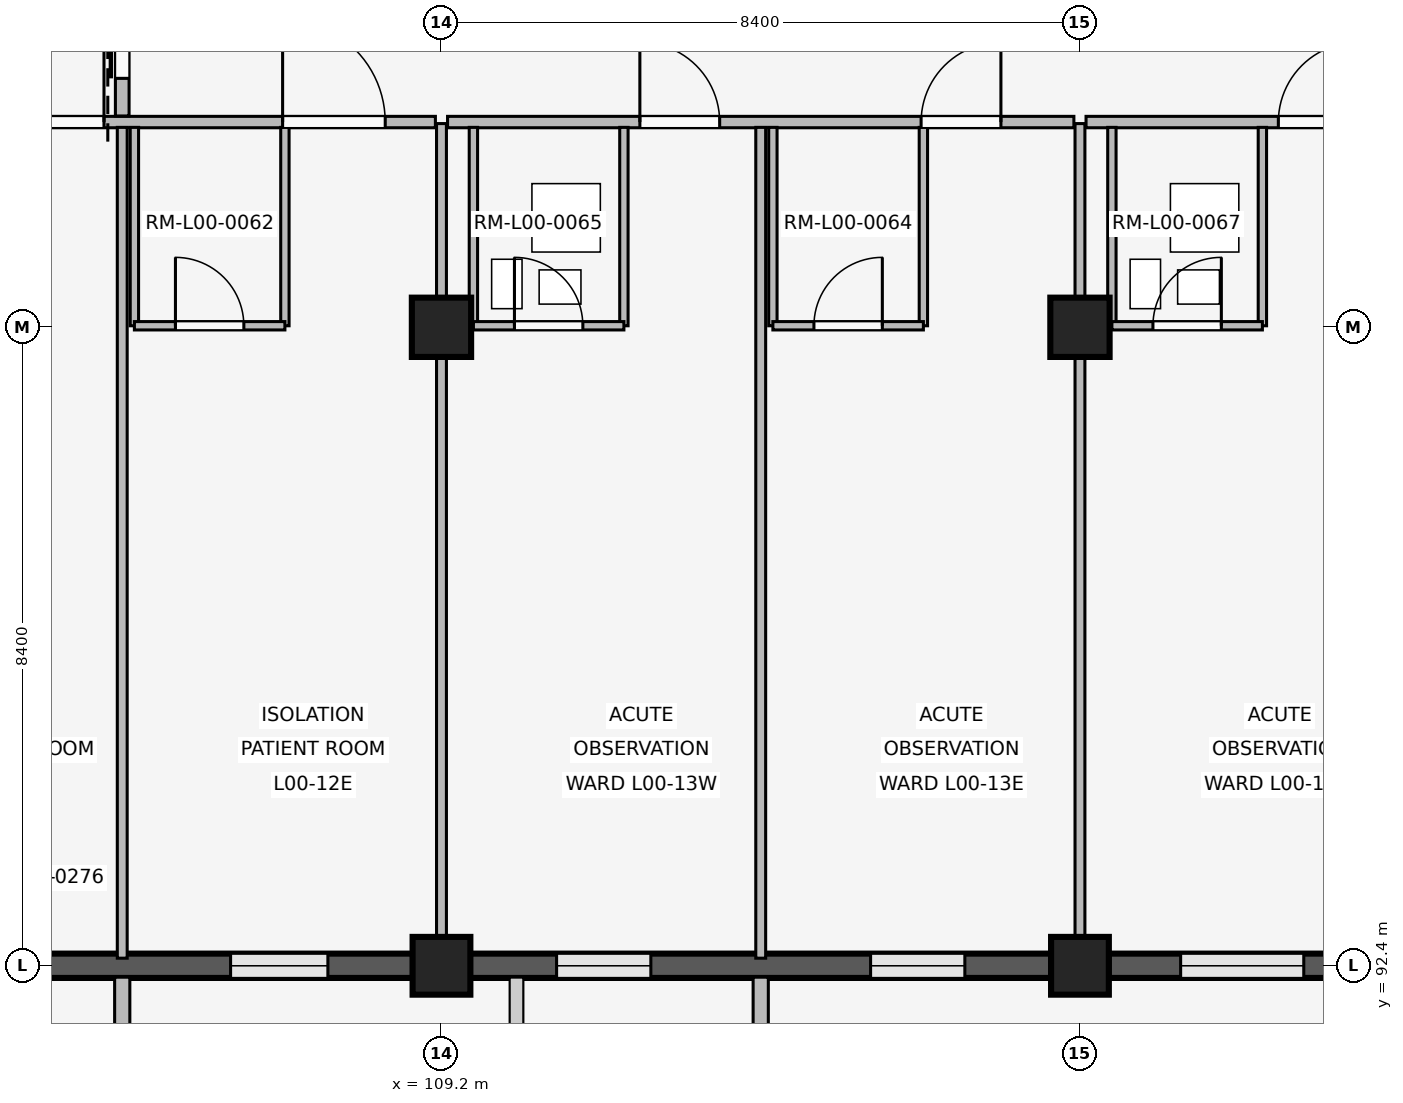
"""IFC4 building model, lengths in metres.
Left out: names, types, materials, properties, quantities, classifications, styles, units other than length and angle.
Written with IfcOpenShell. Run it as: python <this file> out.ifc"""

import sys

from ifc_helpers import new_model, si_unit, direction, frame, frame_2d, origin, origin_2d, place, context, subcontext, project, spatial, rectangle, extrude, element, fill, save


model = new_model("IFC4")
c1 = context("Model", 3, precision=1e-05, world=origin(), true_north=direction((0.0, 1.0)))
c2 = subcontext(c1, "Body", "Model", "MODEL_VIEW")
j1 = project(units=[si_unit("LENGTHUNIT", "METRE"), si_unit("PLANEANGLEUNIT", "RADIAN")], contexts=[c1])
p1 = place(None, origin())
s1 = spatial("IfcSite", under=j1, at=p1, CompositionType="ELEMENT")
p2 = place(p1, origin())
s2 = spatial("IfcBuilding", under=s1, at=p2, CompositionType="ELEMENT")
p3 = place(p2, origin())
s3 = spatial("IfcBuildingStorey", under=s2, at=p3, CompositionType="ELEMENT", Elevation=0.0)
p4 = place(p3, frame((109.2, 92.4, 0.0), z_axis=(0.0, 0.0, 1.0), x_axis=(1.0, 0.0, 0.0)))
e1 = element("IfcColumn", 1, at=p4, inside=s3, PredefinedType="COLUMN", context=c2, shape_type="SweptSolid", body=[
    extrude(rectangle(XDim=0.76, YDim=0.76, at=origin_2d()), origin(), (0.0, 0.0, 1.0), 4.8),
])
p5 = place(p3, frame((109.2, 100.8, 0.0), z_axis=(0.0, 0.0, 1.0), x_axis=(1.0, 0.0, 0.0)))
e2 = element("IfcColumn", 2, at=p5, inside=s3, PredefinedType="COLUMN", context=c2, shape_type="SweptSolid", body=[
    extrude(rectangle(XDim=0.78, YDim=0.78, at=origin_2d()), origin(), (0.0, 0.0, 1.0), 4.8),
])
p6 = place(p3, frame((117.6, 92.4, 0.0), z_axis=(0.0, 0.0, 1.0), x_axis=(1.0, 0.0, 0.0)))
e3 = element("IfcColumn", 3, at=p6, inside=s3, PredefinedType="COLUMN", context=c2, shape_type="SweptSolid", body=[
    extrude(rectangle(XDim=0.76, YDim=0.76, at=origin_2d()), origin(), (0.0, 0.0, 1.0), 4.8),
])
p7 = place(p3, frame((117.6, 100.8, 0.0), z_axis=(0.0, 0.0, 1.0), x_axis=(1.0, 0.0, 0.0)))
e4 = element("IfcColumn", 4, at=p7, inside=s3, PredefinedType="COLUMN", context=c2, shape_type="SweptSolid", body=[
    extrude(rectangle(XDim=0.78, YDim=0.78, at=origin_2d()), origin(), (0.0, 0.0, 1.0), 4.8),
])
p8 = place(p3, frame((108.825, 92.4, 0.0), z_axis=(0.0, 0.0, 1.0), x_axis=(-1.0, 0.0, 0.0)))
e5 = element("IfcWall", 5, at=p8, inside=s3, PredefinedType="SOLIDWALL", context=c2, shape_type="SweptSolid", body=[
    extrude(rectangle(XDim=7.65, YDim=0.32, at=frame_2d((3.825, 0.0))), origin(), (0.0, 0.0, 1.0), 3.82),
])
p9 = place(p8, frame((1.119, 0.0, 0.85)))
e6 = element("IfcOpeningElement", 6, at=p9, cuts=e5, PredefinedType="OPENING", context=c2, shape_type="SweptSolid", body=[
    extrude(rectangle(XDim=1.28, YDim=1.38, at=frame_2d((0.64, 0.69))), frame((0.0, 0.17, 0.0), z_axis=(0.0, -1.0, 0.0), x_axis=(1.0, 0.0, 0.0)), (0.0, 0.0, 1.0), 0.34),
])
p10 = place(p8, frame((5.25, 0.0, 0.85)))
e7 = element("IfcOpeningElement", 7, at=p10, cuts=e5, PredefinedType="OPENING", context=c2, shape_type="SweptSolid", body=[
    extrude(rectangle(XDim=1.28, YDim=1.38, at=frame_2d((0.64, 0.69))), frame((0.0, 0.17, 0.0), z_axis=(0.0, -1.0, 0.0), x_axis=(1.0, 0.0, 0.0)), (0.0, 0.0, 1.0), 0.34),
])
p11 = place(p3, frame((105.0, 92.25, 0.0), z_axis=(0.0, 0.0, 1.0), x_axis=(0.0, -1.0, 0.0)))
e8 = element("IfcWall", 8, at=p11, inside=s3, PredefinedType="ELEMENTEDWALL", context=c2, shape_type="SweptSolid", body=[
    extrude(rectangle(XDim=0.85, YDim=0.2, at=frame_2d((0.425, 0.0))), origin(), (0.0, 0.0, 1.0), 3.8),
])
p12 = place(p3, frame((117.225, 92.4, 0.0), z_axis=(0.0, 0.0, 1.0), x_axis=(-1.0, 0.0, 0.0)))
e9 = element("IfcWall", 9, at=p12, inside=s3, PredefinedType="SOLIDWALL", context=c2, shape_type="SweptSolid", body=[
    extrude(rectangle(XDim=7.65, YDim=0.32, at=frame_2d((3.825, 0.0))), origin(), (0.0, 0.0, 1.0), 3.82),
])
p13 = place(p12, frame((1.139, 0.0, 0.85)))
e10 = element("IfcOpeningElement", 10, at=p13, cuts=e9, PredefinedType="OPENING", context=c2, shape_type="SweptSolid", body=[
    extrude(rectangle(XDim=1.24, YDim=1.34, at=frame_2d((0.62, 0.67))), frame((0.0, 0.17, 0.0), z_axis=(0.0, -1.0, 0.0), x_axis=(1.0, 0.0, 0.0)), (0.0, 0.0, 1.0), 0.34),
])
p14 = place(p12, frame((5.271, 0.0, 0.85)))
e11 = element("IfcOpeningElement", 11, at=p14, cuts=e9, PredefinedType="OPENING", context=c2, shape_type="SweptSolid", body=[
    extrude(rectangle(XDim=1.24, YDim=1.34, at=frame_2d((0.62, 0.67))), frame((0.0, 0.17, 0.0), z_axis=(0.0, -1.0, 0.0), x_axis=(1.0, 0.0, 0.0)), (0.0, 0.0, 1.0), 0.34),
])
p15 = place(p3, frame((113.4, 92.25, 0.0), z_axis=(0.0, 0.0, 1.0), x_axis=(0.0, -1.0, 0.0)))
e12 = element("IfcWall", 12, at=p15, inside=s3, PredefinedType="ELEMENTEDWALL", context=c2, shape_type="SweptSolid", body=[
    extrude(rectangle(XDim=0.85, YDim=0.2, at=frame_2d((0.425, 0.0))), origin(), (0.0, 0.0, 1.0), 3.8),
])
p16 = place(p3, frame((125.625, 92.4, 0.0), z_axis=(0.0, 0.0, 1.0), x_axis=(-1.0, 0.0, 0.0)))
e13 = element("IfcWall", 13, at=p16, inside=s3, PredefinedType="SOLIDWALL", context=c2, shape_type="SweptSolid", body=[
    extrude(rectangle(XDim=7.65, YDim=0.32, at=frame_2d((3.825, 0.0))), origin(), (0.0, 0.0, 1.0), 3.82),
])
p17 = place(p16, frame((0.949, 0.0, 0.85)))
e14 = element("IfcOpeningElement", 14, at=p17, cuts=e13, PredefinedType="OPENING", context=c2, shape_type="SweptSolid", body=[
    extrude(rectangle(XDim=1.62, YDim=1.52, at=frame_2d((0.81, 0.76))), frame((0.0, 0.17, 0.0), z_axis=(0.0, -1.0, 0.0), x_axis=(1.0, 0.0, 0.0)), (0.0, 0.0, 1.0), 0.34),
])
p18 = place(p16, frame((5.081, 0.0, 0.85)))
e15 = element("IfcOpeningElement", 15, at=p18, cuts=e13, PredefinedType="OPENING", context=c2, shape_type="SweptSolid", body=[
    extrude(rectangle(XDim=1.62, YDim=1.52, at=frame_2d((0.81, 0.76))), frame((0.0, 0.17, 0.0), z_axis=(0.0, -1.0, 0.0), x_axis=(1.0, 0.0, 0.0)), (0.0, 0.0, 1.0), 0.34),
])
p19 = place(p3, frame((100.88, 103.5, 0.0), z_axis=(0.0, 0.0, 1.0), x_axis=(1.0, 0.0, 0.0)))
e16 = element("IfcWall", 16, at=p19, inside=s3, PredefinedType="PARTITIONING", context=c2, shape_type="SweptSolid", body=[
    extrude(rectangle(XDim=8.24, YDim=0.15, at=frame_2d((4.12, 0.0))), origin(), (0.0, 0.0, 1.0), 3.8),
])
p20 = place(p19, frame((2.53, 0.0, 0.0)))
e17 = element("IfcOpeningElement", 17, at=p20, cuts=e16, PredefinedType="OPENING", context=c2, shape_type="SweptSolid", body=[
    extrude(rectangle(XDim=1.35, YDim=2.25, at=frame_2d((0.675, 1.125))), frame((0.0, 0.085, 0.0), z_axis=(0.0, -1.0, 0.0), x_axis=(1.0, 0.0, 0.0)), (0.0, 0.0, 1.0), 0.17),
])
p21 = place(p19, frame((6.23, 0.0, 0.0)))
e18 = element("IfcOpeningElement", 18, at=p21, cuts=e16, PredefinedType="OPENING", context=c2, shape_type="SweptSolid", body=[
    extrude(rectangle(XDim=1.35, YDim=2.25, at=frame_2d((0.675, 1.125))), frame((0.0, 0.085, 0.0), z_axis=(0.0, -1.0, 0.0), x_axis=(1.0, 0.0, 0.0)), (0.0, 0.0, 1.0), 0.17),
])
p22 = place(p3, frame((105.0, 92.5, 0.0), z_axis=(0.0, 0.0, 1.0), x_axis=(0.0, 1.0, 0.0)))
e19 = element("IfcWall", 19, at=p22, inside=s3, PredefinedType="PARTITIONING", context=c2, shape_type="SweptSolid", body=[
    extrude(rectangle(XDim=10.93, YDim=0.13, at=frame_2d((5.465, 0.0))), origin(), (0.0, 0.0, 1.0), 3.8),
])
for number, where, z_axis, x_axis in (
    (20, (105.16, 100.82, 0.0), (0.0, 0.0, 1.0), (0.0, 1.0, 0.0)),
    (21, (107.14, 100.82, 0.0), (0.0, 0.0, 1.0), (0.0, 1.0, 0.0)),
):
    element("IfcWall", number, at=place(p3, frame(where, z_axis=z_axis, x_axis=x_axis)), inside=s3, PredefinedType="PARTITIONING", context=c2, shape_type="SweptSolid", body=[
        extrude(rectangle(XDim=2.61, YDim=0.11, at=frame_2d((1.305, 0.0))), origin(), (0.0, 0.0, 1.0), 3.8),
    ])
p23 = place(p3, frame((105.16, 100.82, 0.0), z_axis=(0.0, 0.0, 1.0), x_axis=(1.0, 0.0, 0.0)))
e22 = element("IfcWall", 22, at=p23, inside=s3, PredefinedType="PARTITIONING", context=c2, shape_type="SweptSolid", body=[
    extrude(rectangle(XDim=1.98, YDim=0.11, at=frame_2d((0.99, 0.0))), origin(), (0.0, 0.0, 1.0), 3.8),
])
p24 = place(p23, frame((0.54, 0.0, 0.0)))
e23 = element("IfcOpeningElement", 23, at=p24, cuts=e22, PredefinedType="OPENING", context=c2, shape_type="SweptSolid", body=[
    extrude(rectangle(XDim=0.9, YDim=2.1, at=frame_2d((0.45, 1.05))), frame((0.0, 0.065, 0.0), z_axis=(0.0, -1.0, 0.0), x_axis=(1.0, 0.0, 0.0)), (0.0, 0.0, 1.0), 0.13),
])
p25 = place(p3, frame((103.65, 93.55, 0.0), z_axis=(0.0, 0.0, 1.0), x_axis=(1.0, 0.0, 0.0)))
e24 = element("IfcWall", 24, at=p25, inside=s3, PredefinedType="PLUMBINGWALL", context=c2, shape_type="SweptSolid", body=[
    extrude(rectangle(XDim=0.9, YDim=0.24, at=frame_2d((0.45, 0.0))), origin(), (0.0, 0.0, 1.0), 3.8),
])
p26 = place(p3, frame((105.0, 103.58, 0.0), z_axis=(0.0, 0.0, 1.0), x_axis=(0.0, 1.0, 0.0)))
e25 = element("IfcWall", 25, at=p26, inside=s3, PredefinedType="PARTITIONING", context=c2, shape_type="SweptSolid", body=[
    extrude(rectangle(XDim=2.84, YDim=0.18, at=frame_2d((1.42, 0.0))), origin(), (0.0, 0.0, 1.0), 3.8),
])
p27 = place(p26, frame((0.495, 0.0, 0.0)))
e26 = element("IfcOpeningElement", 26, at=p27, cuts=e25, PredefinedType="OPENING", context=c2, shape_type="SweptSolid", body=[
    extrude(rectangle(XDim=1.85, YDim=2.3, at=frame_2d((0.925, 1.15))), frame((0.0, 0.1, 0.0), z_axis=(0.0, -1.0, 0.0), x_axis=(1.0, 0.0, 0.0)), (0.0, 0.0, 1.0), 0.2),
])
p28 = place(p3, frame((109.2, 92.54, 0.0), z_axis=(0.0, 0.0, 1.0), x_axis=(0.0, 1.0, 0.0)))
e27 = element("IfcWall", 27, at=p28, inside=s3, PredefinedType="PARTITIONING", context=c2, shape_type="SweptSolid", body=[
    extrude(rectangle(XDim=10.94, YDim=0.13, at=frame_2d((5.47, 0.0))), origin(), (0.0, 0.0, 1.0), 3.8),
])
p29 = place(p3, frame((109.28, 103.5, 0.0), z_axis=(0.0, 0.0, 1.0), x_axis=(1.0, 0.0, 0.0)))
e28 = element("IfcWall", 28, at=p29, inside=s3, PredefinedType="PARTITIONING", context=c2, shape_type="SweptSolid", body=[
    extrude(rectangle(XDim=8.24, YDim=0.15, at=frame_2d((4.12, 0.0))), origin(), (0.0, 0.0, 1.0), 3.8),
])
p30 = place(p29, frame((2.53, 0.0, 0.0)))
e29 = element("IfcOpeningElement", 29, at=p30, cuts=e28, PredefinedType="OPENING", context=c2, shape_type="SweptSolid", body=[
    extrude(rectangle(XDim=1.05, YDim=2.2, at=frame_2d((0.525, 1.1))), frame((0.0, 0.085, 0.0), z_axis=(0.0, -1.0, 0.0), x_axis=(1.0, 0.0, 0.0)), (0.0, 0.0, 1.0), 0.17),
])
p31 = place(p29, frame((6.23, 0.0, 0.0)))
e30 = element("IfcOpeningElement", 30, at=p31, cuts=e28, PredefinedType="OPENING", context=c2, shape_type="SweptSolid", body=[
    extrude(rectangle(XDim=1.05, YDim=2.2, at=frame_2d((0.525, 1.1))), frame((0.0, 0.085, 0.0), z_axis=(0.0, -1.0, 0.0), x_axis=(1.0, 0.0, 0.0)), (0.0, 0.0, 1.0), 0.17),
])
p32 = place(p3, frame((113.4, 92.5, 0.0), z_axis=(0.0, 0.0, 1.0), x_axis=(0.0, 1.0, 0.0)))
e31 = element("IfcWall", 31, at=p32, inside=s3, PredefinedType="PARTITIONING", context=c2, shape_type="SweptSolid", body=[
    extrude(rectangle(XDim=10.93, YDim=0.13, at=frame_2d((5.465, 0.0))), origin(), (0.0, 0.0, 1.0), 3.8),
])
for number, where, z_axis, x_axis in (
    (32, (109.62, 100.82, 0.0), (0.0, 0.0, 1.0), (0.0, 1.0, 0.0)),
    (33, (111.6, 100.82, 0.0), (0.0, 0.0, 1.0), (0.0, 1.0, 0.0)),
):
    element("IfcWall", number, at=place(p3, frame(where, z_axis=z_axis, x_axis=x_axis)), inside=s3, PredefinedType="PARTITIONING", context=c2, shape_type="SweptSolid", body=[
        extrude(rectangle(XDim=2.61, YDim=0.11, at=frame_2d((1.305, 0.0))), origin(), (0.0, 0.0, 1.0), 3.8),
    ])
p33 = place(p3, frame((109.62, 100.82, 0.0), z_axis=(0.0, 0.0, 1.0), x_axis=(1.0, 0.0, 0.0)))
e34 = element("IfcWall", 34, at=p33, inside=s3, PredefinedType="PARTITIONING", context=c2, shape_type="SweptSolid", body=[
    extrude(rectangle(XDim=1.98, YDim=0.11, at=frame_2d((0.99, 0.0))), origin(), (0.0, 0.0, 1.0), 3.8),
])
p34 = place(p33, frame((0.54, 0.0, 0.0)))
e35 = element("IfcOpeningElement", 35, at=p34, cuts=e34, PredefinedType="OPENING", context=c2, shape_type="SweptSolid", body=[
    extrude(rectangle(XDim=0.9, YDim=2.1, at=frame_2d((0.45, 1.05))), frame((0.0, 0.065, 0.0), z_axis=(0.0, -1.0, 0.0), x_axis=(1.0, 0.0, 0.0)), (0.0, 0.0, 1.0), 0.13),
])
for number, where, z_axis, x_axis in (
    (36, (113.56, 100.82, 0.0), (0.0, 0.0, 1.0), (0.0, 1.0, 0.0)),
    (37, (115.54, 100.82, 0.0), (0.0, 0.0, 1.0), (0.0, 1.0, 0.0)),
):
    element("IfcWall", number, at=place(p3, frame(where, z_axis=z_axis, x_axis=x_axis)), inside=s3, PredefinedType="PARTITIONING", context=c2, shape_type="SweptSolid", body=[
        extrude(rectangle(XDim=2.61, YDim=0.11, at=frame_2d((1.305, 0.0))), origin(), (0.0, 0.0, 1.0), 3.8),
    ])
p35 = place(p3, frame((113.56, 100.82, 0.0), z_axis=(0.0, 0.0, 1.0), x_axis=(1.0, 0.0, 0.0)))
e38 = element("IfcWall", 38, at=p35, inside=s3, PredefinedType="PARTITIONING", context=c2, shape_type="SweptSolid", body=[
    extrude(rectangle(XDim=1.98, YDim=0.11, at=frame_2d((0.99, 0.0))), origin(), (0.0, 0.0, 1.0), 3.8),
])
p36 = place(p35, frame((0.54, 0.0, 0.0)))
e39 = element("IfcOpeningElement", 39, at=p36, cuts=e38, PredefinedType="OPENING", context=c2, shape_type="SweptSolid", body=[
    extrude(rectangle(XDim=0.9, YDim=2.1, at=frame_2d((0.45, 1.05))), frame((0.0, 0.065, 0.0), z_axis=(0.0, -1.0, 0.0), x_axis=(1.0, 0.0, 0.0)), (0.0, 0.0, 1.0), 0.13),
])
p37 = place(p3, frame((117.6, 92.54, 0.0), z_axis=(0.0, 0.0, 1.0), x_axis=(0.0, 1.0, 0.0)))
e40 = element("IfcWall", 40, at=p37, inside=s3, PredefinedType="PARTITIONING", context=c2, shape_type="SweptSolid", body=[
    extrude(rectangle(XDim=10.94, YDim=0.13, at=frame_2d((5.47, 0.0))), origin(), (0.0, 0.0, 1.0), 3.8),
])
p38 = place(p3, frame((117.68, 103.5, 0.0), z_axis=(0.0, 0.0, 1.0), x_axis=(1.0, 0.0, 0.0)))
e41 = element("IfcWall", 41, at=p38, inside=s3, PredefinedType="PARTITIONING", context=c2, shape_type="SweptSolid", body=[
    extrude(rectangle(XDim=8.24, YDim=0.15, at=frame_2d((4.12, 0.0))), origin(), (0.0, 0.0, 1.0), 3.8),
])
p39 = place(p38, frame((2.53, 0.0, 0.0)))
e42 = element("IfcOpeningElement", 42, at=p39, cuts=e41, PredefinedType="OPENING", context=c2, shape_type="SweptSolid", body=[
    extrude(rectangle(XDim=1.05, YDim=2.2, at=frame_2d((0.525, 1.1))), frame((0.0, 0.085, 0.0), z_axis=(0.0, -1.0, 0.0), x_axis=(1.0, 0.0, 0.0)), (0.0, 0.0, 1.0), 0.17),
])
p40 = place(p38, frame((6.23, 0.0, 0.0)))
e43 = element("IfcOpeningElement", 43, at=p40, cuts=e41, PredefinedType="OPENING", context=c2, shape_type="SweptSolid", body=[
    extrude(rectangle(XDim=1.05, YDim=2.2, at=frame_2d((0.525, 1.1))), frame((0.0, 0.085, 0.0), z_axis=(0.0, -1.0, 0.0), x_axis=(1.0, 0.0, 0.0)), (0.0, 0.0, 1.0), 0.17),
])
for number, where, z_axis, x_axis in (
    (44, (118.02, 100.82, 0.0), (0.0, 0.0, 1.0), (0.0, 1.0, 0.0)),
    (45, (120.0, 100.82, 0.0), (0.0, 0.0, 1.0), (0.0, 1.0, 0.0)),
):
    element("IfcWall", number, at=place(p3, frame(where, z_axis=z_axis, x_axis=x_axis)), inside=s3, PredefinedType="PARTITIONING", context=c2, shape_type="SweptSolid", body=[
        extrude(rectangle(XDim=2.61, YDim=0.11, at=frame_2d((1.305, 0.0))), origin(), (0.0, 0.0, 1.0), 3.8),
    ])
p41 = place(p3, frame((118.02, 100.82, 0.0), z_axis=(0.0, 0.0, 1.0), x_axis=(1.0, 0.0, 0.0)))
e46 = element("IfcWall", 46, at=p41, inside=s3, PredefinedType="PARTITIONING", context=c2, shape_type="SweptSolid", body=[
    extrude(rectangle(XDim=1.98, YDim=0.11, at=frame_2d((0.99, 0.0))), origin(), (0.0, 0.0, 1.0), 3.8),
])
p42 = place(p41, frame((0.54, 0.0, 0.0)))
e47 = element("IfcOpeningElement", 47, at=p42, cuts=e46, PredefinedType="OPENING", context=c2, shape_type="SweptSolid", body=[
    extrude(rectangle(XDim=0.9, YDim=2.1, at=frame_2d((0.45, 1.05))), frame((0.0, 0.065, 0.0), z_axis=(0.0, -1.0, 0.0), x_axis=(1.0, 0.0, 0.0)), (0.0, 0.0, 1.0), 0.13),
])
p43 = place(p9, origin())
e48 = element("IfcWindow", 48, at=p43, inside=s3, PartitioningType="SINGLE_PANEL", PredefinedType="WINDOW", context=c2, shape_type="SweptSolid", body=[
    extrude(rectangle(XDim=1.28, YDim=1.38, at=frame_2d((0.64, 0.69))), frame((0.0, 0.03, 0.0), z_axis=(0.0, -1.0, 0.0), x_axis=(1.0, 0.0, 0.0)), (0.0, 0.0, 1.0), 0.06),
])
fill(e6, e48)
p44 = place(p13, origin())
e49 = element("IfcWindow", 49, at=p44, inside=s3, PartitioningType="SINGLE_PANEL", PredefinedType="WINDOW", context=c2, shape_type="SweptSolid", body=[
    extrude(rectangle(XDim=1.24, YDim=1.34, at=frame_2d((0.62, 0.67))), frame((0.0, 0.03, 0.0), z_axis=(0.0, -1.0, 0.0), x_axis=(1.0, 0.0, 0.0)), (0.0, 0.0, 1.0), 0.06),
])
fill(e10, e49)
p45 = place(p14, origin())
e50 = element("IfcWindow", 50, at=p45, inside=s3, PartitioningType="SINGLE_PANEL", PredefinedType="WINDOW", context=c2, shape_type="SweptSolid", body=[
    extrude(rectangle(XDim=1.24, YDim=1.34, at=frame_2d((0.62, 0.67))), frame((0.0, 0.03, 0.0), z_axis=(0.0, -1.0, 0.0), x_axis=(1.0, 0.0, 0.0)), (0.0, 0.0, 1.0), 0.06),
])
fill(e11, e50)
p46 = place(p18, origin())
e51 = element("IfcWindow", 51, at=p46, inside=s3, PartitioningType="SINGLE_PANEL", PredefinedType="WINDOW", context=c2, shape_type="SweptSolid", body=[
    extrude(rectangle(XDim=1.62, YDim=1.52, at=frame_2d((0.81, 0.76))), frame((0.0, 0.03, 0.0), z_axis=(0.0, -1.0, 0.0), x_axis=(1.0, 0.0, 0.0)), (0.0, 0.0, 1.0), 0.06),
])
fill(e15, e51)
p47 = place(p20, origin())
e52 = element("IfcDoor", 52, at=p47, inside=s3, OperationType="SINGLE_SWING_RIGHT", PredefinedType="DOOR", context=c2, shape_type="SweptSolid", body=[
    extrude(rectangle(XDim=1.35, YDim=2.25, at=frame_2d((0.675, 1.125))), frame((0.0, 0.025, 0.0), z_axis=(0.0, -1.0, 0.0), x_axis=(1.0, 0.0, 0.0)), (0.0, 0.0, 1.0), 0.05),
])
fill(e17, e52)
p48 = place(p21, origin())
e53 = element("IfcDoor", 53, at=p48, inside=s3, OperationType="SINGLE_SWING_LEFT", PredefinedType="DOOR", context=c2, shape_type="SweptSolid", body=[
    extrude(rectangle(XDim=1.35, YDim=2.25, at=frame_2d((0.675, 1.125))), frame((0.0, 0.025, 0.0), z_axis=(0.0, -1.0, 0.0), x_axis=(1.0, 0.0, 0.0)), (0.0, 0.0, 1.0), 0.05),
])
fill(e18, e53)
p49 = place(p24, origin())
e54 = element("IfcDoor", 54, at=p49, inside=s3, OperationType="SINGLE_SWING_LEFT", PredefinedType="DOOR", context=c2, shape_type="SweptSolid", body=[
    extrude(rectangle(XDim=0.9, YDim=2.1, at=frame_2d((0.45, 1.05))), frame((0.0, 0.025, 0.0), z_axis=(0.0, -1.0, 0.0), x_axis=(1.0, 0.0, 0.0)), (0.0, 0.0, 1.0), 0.05),
])
fill(e23, e54)
p50 = place(p27, origin())
e55 = element("IfcDoor", 55, at=p50, inside=s3, OperationType="SLIDING_TO_LEFT", PredefinedType="DOOR", context=c2, shape_type="SweptSolid", body=[
    extrude(rectangle(XDim=1.85, YDim=2.3, at=frame_2d((0.925, 1.15))), frame((0.0, 0.025, 0.0), z_axis=(0.0, -1.0, 0.0), x_axis=(1.0, 0.0, 0.0)), (0.0, 0.0, 1.0), 0.05),
])
fill(e26, e55)
p51 = place(p30, origin())
e56 = element("IfcDoor", 56, at=p51, inside=s3, OperationType="SINGLE_SWING_LEFT", PredefinedType="DOOR", context=c2, shape_type="SweptSolid", body=[
    extrude(rectangle(XDim=1.05, YDim=2.2, at=frame_2d((0.525, 1.1))), frame((0.0, 0.025, 0.0), z_axis=(0.0, -1.0, 0.0), x_axis=(1.0, 0.0, 0.0)), (0.0, 0.0, 1.0), 0.05),
])
fill(e29, e56)
p52 = place(p31, origin())
e57 = element("IfcDoor", 57, at=p52, inside=s3, OperationType="SINGLE_SWING_RIGHT", PredefinedType="DOOR", context=c2, shape_type="SweptSolid", body=[
    extrude(rectangle(XDim=1.05, YDim=2.2, at=frame_2d((0.525, 1.1))), frame((0.0, 0.025, 0.0), z_axis=(0.0, -1.0, 0.0), x_axis=(1.0, 0.0, 0.0)), (0.0, 0.0, 1.0), 0.05),
])
fill(e30, e57)
p53 = place(p34, origin())
e58 = element("IfcDoor", 58, at=p53, inside=s3, OperationType="SINGLE_SWING_LEFT", PredefinedType="DOOR", context=c2, shape_type="SweptSolid", body=[
    extrude(rectangle(XDim=0.9, YDim=2.1, at=frame_2d((0.45, 1.05))), frame((0.0, 0.025, 0.0), z_axis=(0.0, -1.0, 0.0), x_axis=(1.0, 0.0, 0.0)), (0.0, 0.0, 1.0), 0.05),
])
fill(e35, e58)
p54 = place(p36, origin())
e59 = element("IfcDoor", 59, at=p54, inside=s3, OperationType="SINGLE_SWING_RIGHT", PredefinedType="DOOR", context=c2, shape_type="SweptSolid", body=[
    extrude(rectangle(XDim=0.9, YDim=2.1, at=frame_2d((0.45, 1.05))), frame((0.0, 0.025, 0.0), z_axis=(0.0, -1.0, 0.0), x_axis=(1.0, 0.0, 0.0)), (0.0, 0.0, 1.0), 0.05),
])
fill(e39, e59)
p55 = place(p39, origin())
e60 = element("IfcDoor", 60, at=p55, inside=s3, OperationType="SINGLE_SWING_RIGHT", PredefinedType="DOOR", context=c2, shape_type="SweptSolid", body=[
    extrude(rectangle(XDim=1.05, YDim=2.2, at=frame_2d((0.525, 1.1))), frame((0.0, 0.025, 0.0), z_axis=(0.0, -1.0, 0.0), x_axis=(1.0, 0.0, 0.0)), (0.0, 0.0, 1.0), 0.05),
])
fill(e42, e60)
p56 = place(p42, origin())
e61 = element("IfcDoor", 61, at=p56, inside=s3, OperationType="SINGLE_SWING_RIGHT", PredefinedType="DOOR", context=c2, shape_type="SweptSolid", body=[
    extrude(rectangle(XDim=0.9, YDim=2.1, at=frame_2d((0.45, 1.05))), frame((0.0, 0.025, 0.0), z_axis=(0.0, -1.0, 0.0), x_axis=(1.0, 0.0, 0.0)), (0.0, 0.0, 1.0), 0.05),
])
fill(e47, e61)
save(model, sys.argv[1])
